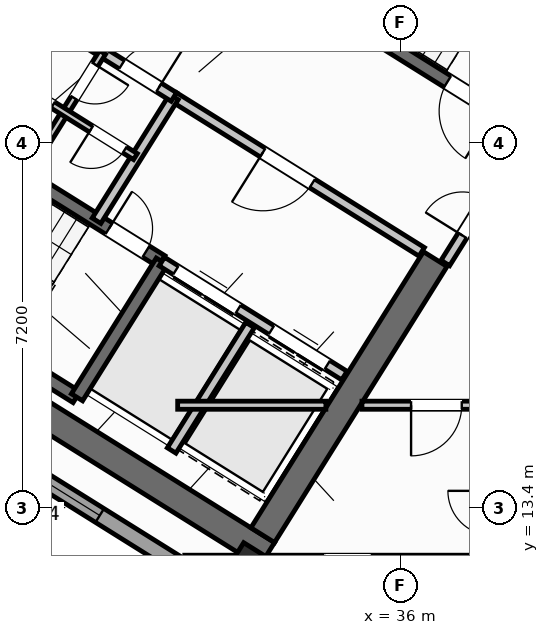
"""IFC4 building model, lengths in metres.
Left out: names, types, materials, properties, quantities, classifications, styles, units other than length and angle.
Written with IfcOpenShell. Run it as: python <this file> out.ifc"""

import sys

from ifc_helpers import new_model, si_unit, direction, frame, frame_2d, origin, origin_2d, place, context, subcontext, project, spatial, rectangle, hollow_rectangle, extrude, source, transform, mapped, element, fill, save


model = new_model("IFC4")
c1 = context("Model", 3, precision=1e-05, world=origin(), true_north=direction((0.0, 1.0)))
c2 = subcontext(c1, "Body", "Model", "MODEL_VIEW")
j1 = project(units=[si_unit("LENGTHUNIT", "METRE"), si_unit("PLANEANGLEUNIT", "RADIAN")], contexts=[c1])
p1 = place(None, origin())
s1 = spatial("IfcSite", under=j1, at=p1, CompositionType="ELEMENT")
p2 = place(p1, origin())
s2 = spatial("IfcBuilding", under=s1, at=p2, CompositionType="ELEMENT")
p3 = place(p2, frame((0.0, 0.0, 112.5)))
s3 = spatial("IfcBuildingStorey", under=s2, at=p3, CompositionType="ELEMENT", Elevation=112.5)
p4 = place(p3, frame((33.366, 12.477, 0.0), z_axis=(0.0, 0.0, 1.0), x_axis=(-0.848047359947, 0.529920442413, 0.0)))
e1 = element("IfcWall", 1, at=p4, inside=s3, PredefinedType="SHEAR", context=c2, shape_type="SweptSolid", body=[
    extrude(rectangle(XDim=13.14, YDim=0.55, at=frame_2d((6.57, 0.0))), origin(), (0.0, 0.0, 1.0), 3.35),
])
p5 = place(p3, frame((36.683, 18.304, 0.0), z_axis=(0.0, 0.0, 1.0), x_axis=(-0.529896466841, -0.848062341122, 0.0)))
e2 = element("IfcWall", 2, at=p5, inside=s3, PredefinedType="SHEAR", context=c2, shape_type="SweptSolid", body=[
    extrude(rectangle(XDim=6.425, YDim=0.55, at=frame_2d((3.212, 0.0))), origin(), (0.0, 0.0, 1.0), 3.35),
])
m1 = source(origin(), c2, "Body", "SweptSolid", [
    extrude(hollow_rectangle(XDim=0.9, YDim=0.9, WallThickness=0.036, at=origin_2d()), origin(), (0.0, 0.0, 1.0), 3.6),
])
p6 = place(p3, frame((33.046, 12.087, 0.0), z_axis=(0.0, 0.0, 1.0), x_axis=(-0.848048096156, 0.529919264233, 0.0)))
e3 = element("IfcColumn", 3, at=p6, inside=s3, PredefinedType="COLUMN", context=c2, shape_type="MappedRepresentation", body=[
    mapped(m1, transform((0.0, 0.0, 0.0), scale=1.0)),
])
p7 = place(p3, frame((31.76, 12.183, 0.0), z_axis=(0.0, 0.0, 1.0), x_axis=(-0.848047074256, 0.529920899612, 0.0)))
e4 = element("IfcWall", 4, at=p7, inside=s3, PredefinedType="STANDARD", context=c2, shape_type="SweptSolid", body=[
    extrude(rectangle(XDim=30.652, YDim=0.32, at=frame_2d((15.326, 0.0))), origin(), (0.0, 0.0, 1.0), 3.35),
])
p8 = place(p7, frame((15.153, 0.0, 0.0)))
e5 = element("IfcOpeningElement", 5, at=p8, cuts=e4, PredefinedType="OPENING", context=c2, shape_type="SweptSolid", body=[
    extrude(rectangle(XDim=1.2, YDim=2.15, at=frame_2d((0.6, 1.075))), frame((0.0, 0.17, 0.0), z_axis=(0.0, -1.0, 0.0), x_axis=(1.0, 0.0, 0.0)), (0.0, 0.0, 1.0), 0.34),
])
p9 = place(p7, frame((2.002, 0.0, 0.8)))
e6 = element("IfcOpeningElement", 6, at=p9, cuts=e4, PredefinedType="OPENING", context=c2, shape_type="SweptSolid", body=[
    extrude(rectangle(XDim=2.1, YDim=1.55, at=frame_2d((1.05, 0.775))), frame((0.0, 0.17, 0.0), z_axis=(0.0, -1.0, 0.0), x_axis=(1.0, 0.0, 0.0)), (0.0, 0.0, 1.0), 0.34),
])
p10 = place(p7, frame((7.206, 0.0, 0.8)))
e7 = element("IfcOpeningElement", 7, at=p10, cuts=e4, PredefinedType="OPENING", context=c2, shape_type="SweptSolid", body=[
    extrude(rectangle(XDim=2.1, YDim=1.55, at=frame_2d((1.05, 0.775))), frame((0.0, 0.17, 0.0), z_axis=(0.0, -1.0, 0.0), x_axis=(1.0, 0.0, 0.0)), (0.0, 0.0, 1.0), 0.34),
])
p11 = place(p7, frame((12.648, 0.0, 1.0)))
e8 = element("IfcOpeningElement", 8, at=p11, cuts=e4, PredefinedType="OPENING", context=c2, shape_type="SweptSolid", body=[
    extrude(rectangle(XDim=0.9, YDim=1.25, at=frame_2d((0.45, 0.625))), frame((0.0, 0.17, 0.0), z_axis=(0.0, -1.0, 0.0), x_axis=(1.0, 0.0, 0.0)), (0.0, 0.0, 1.0), 0.34),
])
p12 = place(p7, frame((19.59, 0.0, 0.95)))
e9 = element("IfcOpeningElement", 9, at=p12, cuts=e4, PredefinedType="OPENING", context=c2, shape_type="SweptSolid", body=[
    extrude(rectangle(XDim=1.2, YDim=1.4, at=frame_2d((0.6, 0.7))), frame((0.0, 0.17, 0.0), z_axis=(0.0, -1.0, 0.0), x_axis=(1.0, 0.0, 0.0)), (0.0, 0.0, 1.0), 0.34),
])
p13 = place(p7, frame((25.966, 0.0, 1.0)))
e10 = element("IfcOpeningElement", 10, at=p13, cuts=e4, PredefinedType="OPENING", context=c2, shape_type="SweptSolid", body=[
    extrude(rectangle(XDim=0.9, YDim=1.25, at=frame_2d((0.45, 0.625))), frame((0.0, 0.17, 0.0), z_axis=(0.0, -1.0, 0.0), x_axis=(1.0, 0.0, 0.0)), (0.0, 0.0, 1.0), 0.34),
])
p14 = place(p7, frame((28.871, 0.0, 1.0)))
e11 = element("IfcOpeningElement", 11, at=p14, cuts=e4, PredefinedType="OPENING", context=c2, shape_type="SweptSolid", body=[
    extrude(rectangle(XDim=0.9, YDim=1.25, at=frame_2d((0.45, 0.625))), frame((0.0, 0.17, 0.0), z_axis=(0.0, -1.0, 0.0), x_axis=(1.0, 0.0, 0.0)), (0.0, 0.0, 1.0), 0.34),
])
p15 = place(p3, frame((29.605, 15.581, 0.0), z_axis=(0.0, 0.0, 1.0), x_axis=(-0.848036911448, 0.529937163087, 0.0)))
e12 = element("IfcWall", 12, at=p15, inside=s3, PredefinedType="SHEAR", context=c2, shape_type="SweptSolid", body=[
    extrude(rectangle(XDim=7.46, YDim=0.26, at=frame_2d((3.73, 0.0))), origin(), (0.0, 0.0, 1.0), 3.35),
])
p16 = place(p3, frame((31.28, 18.261, 0.0), z_axis=(0.0, 0.0, 1.0), x_axis=(-0.848051618787, 0.529913626805, 0.0)))
e13 = element("IfcWall", 13, at=p16, inside=s3, PredefinedType="SHEAR", context=c2, shape_type="SweptSolid", body=[
    extrude(rectangle(XDim=7.46, YDim=0.26, at=frame_2d((3.73, 0.0))), origin(), (0.0, 0.0, 1.0), 3.35),
])
p17 = place(p16, frame((0.36, 0.0, 0.0)))
e14 = element("IfcOpeningElement", 14, at=p17, cuts=e13, PredefinedType="OPENING", context=c2, shape_type="SweptSolid", body=[
    extrude(rectangle(XDim=0.86, YDim=2.05, at=frame_2d((0.43, 1.025))), frame((0.0, 0.14, 0.0), z_axis=(0.0, -1.0, 0.0), x_axis=(1.0, 0.0, 0.0)), (0.0, 0.0, 1.0), 0.28),
])
p18 = place(p3, frame((31.288, 18.256, 0.0), z_axis=(0.0, 0.0, 1.0), x_axis=(-0.529943379326, -0.848033026897, 0.0)))
e15 = element("IfcWall", 15, at=p18, inside=s3, PredefinedType="SHEAR", context=c2, shape_type="SweptSolid", body=[
    extrude(rectangle(XDim=3.16, YDim=0.26, at=frame_2d((1.58, 0.0))), origin(), (0.0, 0.0, 1.0), 3.35),
])
p19 = place(p3, frame((38.046, 21.108, 0.0), z_axis=(0.0, 0.0, 1.0), x_axis=(-0.848054434086, 0.529909121291, 0.0)))
e16 = element("IfcWall", 16, at=p19, inside=s3, PredefinedType="SHEAR", context=c2, shape_type="SweptSolid", body=[
    extrude(rectangle(XDim=7.33, YDim=0.26, at=frame_2d((3.665, 0.0))), origin(), (0.0, 0.0, 1.0), 3.35),
])
p20 = place(p19, frame((0.22, 0.0, 0.0)))
e17 = element("IfcOpeningElement", 17, at=p20, cuts=e16, PredefinedType="OPENING", context=c2, shape_type="SweptSolid", body=[
    extrude(rectangle(XDim=1.1, YDim=2.1, at=frame_2d((0.55, 1.05))), frame((0.0, 0.14, 0.0), z_axis=(0.0, -1.0, 0.0), x_axis=(1.0, 0.0, 0.0)), (0.0, 0.0, 1.0), 0.28),
])
p21 = place(p3, frame((34.891, 16.005, 0.0), z_axis=(0.0, 0.0, 1.0), x_axis=(-0.848062873452, 0.529895614884, 0.0)))
e18 = element("IfcWall", 18, at=p21, inside=s3, PredefinedType="STANDARD", context=c2, shape_type="SweptSolid", body=[
    extrude(rectangle(XDim=4.248, YDim=0.2, at=frame_2d((2.124, 0.0))), origin(), (0.0, 0.0, 1.0), 3.34),
])
p22 = place(p21, frame((0.398, 0.0, 0.0)))
e19 = element("IfcOpeningElement", 19, at=p22, cuts=e18, PredefinedType="OPENING", context=c2, shape_type="SweptSolid", body=[
    extrude(rectangle(XDim=1.3, YDim=2.2, at=frame_2d((0.65, 1.1))), frame((0.0, 0.11, 0.0), z_axis=(0.0, -1.0, 0.0), x_axis=(1.0, 0.0, 0.0)), (0.0, 0.0, 1.0), 0.22),
])
p23 = place(p21, frame((2.473, 0.0, 0.0)))
e20 = element("IfcOpeningElement", 20, at=p23, cuts=e18, PredefinedType="OPENING", context=c2, shape_type="SweptSolid", body=[
    extrude(rectangle(XDim=1.45, YDim=2.25, at=frame_2d((0.725, 1.125))), frame((0.0, 0.11, 0.0), z_axis=(0.0, -1.0, 0.0), x_axis=(1.0, 0.0, 0.0)), (0.0, 0.0, 1.0), 0.22),
])
p24 = place(p3, frame((36.417, 18.447, 0.0), z_axis=(0.0, 0.0, 1.0), x_axis=(-0.848064879198, 0.529892404805, 0.0)))
e21 = element("IfcWall", 21, at=p24, inside=s3, PredefinedType="STANDARD", context=c2, shape_type="SweptSolid", body=[
    extrude(rectangle(XDim=5.768, YDim=0.2, at=frame_2d((2.884, 0.0))), origin(), (0.0, 0.0, 1.0), 3.34),
])
p25 = place(p24, frame((2.548, 0.0, 0.0)))
e22 = element("IfcOpeningElement", 22, at=p25, cuts=e21, PredefinedType="OPENING", context=c2, shape_type="SweptSolid", body=[
    extrude(rectangle(XDim=1.15, YDim=2.1, at=frame_2d((0.575, 1.05))), frame((0.0, 0.11, 0.0), z_axis=(0.0, -1.0, 0.0), x_axis=(1.0, 0.0, 0.0)), (0.0, 0.0, 1.0), 0.22),
])
p26 = place(p3, frame((33.029, 17.003, 0.0), z_axis=(0.0, 0.0, 1.0), x_axis=(-0.529916267533, -0.848049968695, 0.0)))
e23 = element("IfcWall", 23, at=p26, inside=s3, PredefinedType="STANDARD", context=c2, shape_type="SweptSolid", body=[
    extrude(rectangle(XDim=2.92, YDim=0.2, at=frame_2d((1.46, 0.0))), origin(), (0.0, 0.0, 1.0), 3.34),
])
p27 = place(p3, frame((31.525, 21.504, 0.0), z_axis=(0.0, 0.0, 1.0), x_axis=(-0.529907497854, -0.848055448493, 0.0)))
e24 = element("IfcWall", 24, at=p27, inside=s3, PredefinedType="STANDARD", context=c2, shape_type="SweptSolid", body=[
    extrude(rectangle(XDim=2.88, YDim=0.2, at=frame_2d((1.44, 0.0))), origin(), (0.0, 0.0, 1.0), 3.34),
])
p28 = place(p3, frame((31.525, 21.504, 0.0), z_axis=(0.0, 0.0, 1.0), x_axis=(-0.848040211232, 0.529931882541, 0.0)))
e25 = element("IfcWall", 25, at=p28, inside=s3, PredefinedType="STANDARD", context=c2, shape_type="SweptSolid", body=[
    extrude(rectangle(XDim=6.218, YDim=0.2, at=frame_2d((3.109, 0.0))), origin(), (0.0, 0.0, 1.0), 3.34),
])
p29 = place(p28, frame((4.4, 0.0, 0.0)))
e26 = element("IfcOpeningElement", 26, at=p29, cuts=e25, PredefinedType="OPENING", context=c2, shape_type="SweptSolid", body=[
    extrude(rectangle(XDim=0.86, YDim=2.05, at=frame_2d((0.43, 1.025))), frame((0.0, 0.11, 0.0), z_axis=(0.0, -1.0, 0.0), x_axis=(1.0, 0.0, 0.0)), (0.0, 0.0, 1.0), 0.22),
])
p30 = place(p28, frame((0.35, 0.0, 0.0)))
e27 = element("IfcOpeningElement", 27, at=p30, cuts=e25, PredefinedType="OPENING", context=c2, shape_type="SweptSolid", body=[
    extrude(rectangle(XDim=0.86, YDim=2.05, at=frame_2d((0.43, 1.025))), frame((0.0, 0.11, 0.0), z_axis=(0.0, -1.0, 0.0), x_axis=(1.0, 0.0, 0.0)), (0.0, 0.0, 1.0), 0.22),
])
p31 = place(p3, frame((30.117, 22.384, 0.0), z_axis=(0.0, 0.0, 1.0), x_axis=(-0.529951914384, -0.848027693204, 0.0)))
e28 = element("IfcWall", 28, at=p31, inside=s3, PredefinedType="PLUMBINGWALL", context=c2, shape_type="SweptSolid", body=[
    extrude(rectangle(XDim=1.4, YDim=0.14, at=frame_2d((0.7, 0.0))), origin(), (0.0, 0.0, 1.0), 3.34),
])
p32 = place(p31, frame((0.28, 0.0, 0.0)))
e29 = element("IfcOpeningElement", 29, at=p32, cuts=e28, PredefinedType="OPENING", context=c2, shape_type="SweptSolid", body=[
    extrude(rectangle(XDim=0.78, YDim=2.05, at=frame_2d((0.39, 1.025))), frame((0.0, 0.08, 0.0), z_axis=(0.0, -1.0, 0.0), x_axis=(1.0, 0.0, 0.0)), (0.0, 0.0, 1.0), 0.16),
])
p33 = place(p3, frame((29.375, 21.196, 0.0), z_axis=(0.0, 0.0, 1.0), x_axis=(-0.529865479138, -0.848081702443, 0.0)))
e30 = element("IfcWall", 30, at=p33, inside=s3, PredefinedType="PLUMBINGWALL", context=c2, shape_type="SweptSolid", body=[
    extrude(rectangle(XDim=1.48, YDim=0.14, at=frame_2d((0.74, 0.0))), origin(), (0.0, 0.0, 1.0), 3.34),
])
p34 = place(p3, frame((30.766, 20.327, 0.0), z_axis=(0.0, 0.0, 1.0), x_axis=(-0.848052663127, 0.529911955482, 0.0)))
e31 = element("IfcWall", 31, at=p34, inside=s3, PredefinedType="PLUMBINGWALL", context=c2, shape_type="SweptSolid", body=[
    extrude(rectangle(XDim=3.28, YDim=0.14, at=frame_2d((1.64, 0.0))), origin(), (0.0, 0.0, 1.0), 3.34),
])
p35 = place(p34, frame((0.25, 0.0, 0.0)))
e32 = element("IfcOpeningElement", 32, at=p35, cuts=e31, PredefinedType="OPENING", context=c2, shape_type="SweptSolid", body=[
    extrude(rectangle(XDim=0.78, YDim=2.05, at=frame_2d((0.39, 1.025))), frame((0.0, 0.08, 0.0), z_axis=(0.0, -1.0, 0.0), x_axis=(1.0, 0.0, 0.0)), (0.0, 0.0, 1.0), 0.16),
])
p36 = place(p34, frame((1.92, 0.0, 0.0)))
e33 = element("IfcOpeningElement", 33, at=p36, cuts=e31, PredefinedType="OPENING", context=c2, shape_type="SweptSolid", body=[
    extrude(rectangle(XDim=0.78, YDim=2.05, at=frame_2d((0.39, 1.025))), frame((0.0, 0.08, 0.0), z_axis=(0.0, -1.0, 0.0), x_axis=(1.0, 0.0, 0.0)), (0.0, 0.0, 1.0), 0.16),
])
p37 = place(p3, frame((38.451, 20.737, 0.0), z_axis=(0.0, 0.0, 1.0), x_axis=(-0.529924799939, -0.848044637038, 0.0)))
e34 = element("IfcWall", 34, at=p37, inside=s3, PredefinedType="STANDARD", context=c2, shape_type="SweptSolid", body=[
    extrude(rectangle(XDim=2.96, YDim=0.2, at=frame_2d((1.48, 0.0))), origin(), (0.0, 0.0, 1.0), 3.34),
])
p38 = place(p37, frame((1.46, 0.0, 0.0)))
e35 = element("IfcOpeningElement", 35, at=p38, cuts=e34, PredefinedType="OPENING", context=c2, shape_type="SweptSolid", body=[
    extrude(rectangle(XDim=0.86, YDim=2.05, at=frame_2d((0.43, 1.025))), frame((0.0, 0.11, 0.0), z_axis=(0.0, -1.0, 0.0), x_axis=(1.0, 0.0, 0.0)), (0.0, 0.0, 1.0), 0.22),
])
p39 = place(p3, frame((31.6, 15.42, 0.0), z_axis=(0.0, 0.0, 1.0), x_axis=(1.0, 0.0, 0.0)))
e36 = element("IfcWall", 36, at=p39, inside=s3, PredefinedType="PARTITIONING", context=c2, shape_type="SweptSolid", body=[
    extrude(rectangle(XDim=2.925, YDim=0.16, at=frame_2d((1.462, 0.0))), origin(), (0.0, 0.0, 1.0), 3.34),
])
p40 = place(p3, frame((35.237, 15.42, 0.0), z_axis=(0.0, 0.0, 1.0), x_axis=(1.0, 0.0, 0.0)))
e37 = element("IfcWall", 37, at=p40, inside=s3, PredefinedType="PARTITIONING", context=c2, shape_type="SweptSolid", body=[
    extrude(rectangle(XDim=15.432, YDim=0.16, at=frame_2d((7.716, 0.0))), origin(), (0.0, 0.0, 1.0), 3.34),
])
p41 = place(p40, frame((0.969, 0.0, 0.0)))
e38 = element("IfcOpeningElement", 38, at=p41, cuts=e37, PredefinedType="OPENING", context=c2, shape_type="SweptSolid", body=[
    extrude(rectangle(XDim=1.0, YDim=2.1, at=frame_2d((0.5, 1.05))), frame((0.0, 0.09, 0.0), z_axis=(0.0, -1.0, 0.0), x_axis=(1.0, 0.0, 0.0)), (0.0, 0.0, 1.0), 0.18),
])
p42 = place(p40, frame((8.799, 0.0, 0.0)))
e39 = element("IfcOpeningElement", 39, at=p42, cuts=e37, PredefinedType="OPENING", context=c2, shape_type="SweptSolid", body=[
    extrude(rectangle(XDim=1.0, YDim=2.1, at=frame_2d((0.5, 1.05))), frame((0.0, 0.09, 0.0), z_axis=(0.0, -1.0, 0.0), x_axis=(1.0, 0.0, 0.0)), (0.0, 0.0, 1.0), 0.18),
])
m2 = source(origin(), c2, "Body", "SweptSolid", [
    extrude(rectangle(XDim=2.1, YDim=1.55, at=frame_2d((1.05, 0.775))), frame((0.0, 0.03, 0.0), z_axis=(0.0, -1.0, 0.0), x_axis=(1.0, 0.0, 0.0)), (0.0, 0.0, 1.0), 0.06),
])
p43 = place(p9, origin())
e40 = element("IfcWindow", 40, at=p43, inside=s3, PartitioningType="SINGLE_PANEL", PredefinedType="WINDOW", context=c2, shape_type="MappedRepresentation", body=[
    mapped(m2, transform((0.0, 0.0, 0.0), scale=1.0)),
])
fill(e6, e40)
m3 = source(origin(), c2, "Body", "SweptSolid", [
    extrude(rectangle(XDim=0.86, YDim=2.05, at=frame_2d((0.43, 1.025))), frame((0.0, 0.025, 0.0), z_axis=(0.0, -1.0, 0.0), x_axis=(1.0, 0.0, 0.0)), (0.0, 0.0, 1.0), 0.05),
])
p44 = place(p17, frame((0.86, 0.0, 0.0), z_axis=(0.0, 0.0, 1.0), x_axis=(-1.0, 0.0, 0.0)))
e41 = element("IfcDoor", 41, at=p44, inside=s3, OperationType="SINGLE_SWING_LEFT", PredefinedType="DOOR", context=c2, shape_type="MappedRepresentation", body=[
    mapped(m3, transform((0.0, 0.0, 0.0), scale=1.0)),
])
fill(e14, e41)
m4 = source(origin(), c2, "Body", "SweptSolid", [
    extrude(rectangle(XDim=1.1, YDim=2.1, at=frame_2d((0.55, 1.05))), frame((0.0, 0.025, 0.0), z_axis=(0.0, -1.0, 0.0), x_axis=(1.0, 0.0, 0.0)), (0.0, 0.0, 1.0), 0.05),
])
p45 = place(p20, origin())
e42 = element("IfcDoor", 42, at=p45, inside=s3, OperationType="SINGLE_SWING_LEFT", PredefinedType="DOOR", context=c2, shape_type="MappedRepresentation", body=[
    mapped(m4, transform((0.0, 0.0, 0.0), scale=1.0)),
])
fill(e17, e42)
m5 = source(origin(), c2, "Body", "SweptSolid", [
    extrude(rectangle(XDim=1.15, YDim=2.1, at=frame_2d((0.575, 1.05))), frame((0.0, 0.025, 0.0), z_axis=(0.0, -1.0, 0.0), x_axis=(1.0, 0.0, 0.0)), (0.0, 0.0, 1.0), 0.05),
])
p46 = place(p25, origin())
e43 = element("IfcDoor", 43, at=p46, inside=s3, OperationType="SINGLE_SWING_RIGHT", PredefinedType="DOOR", context=c2, shape_type="MappedRepresentation", body=[
    mapped(m5, transform((0.0, 0.0, 0.0), scale=1.0)),
])
fill(e22, e43)
m6 = source(origin(), c2, "Body", "SweptSolid", [
    extrude(rectangle(XDim=1.3, YDim=2.2, at=frame_2d((0.65, 1.1))), frame((0.0, 0.025, 0.0), z_axis=(0.0, -1.0, 0.0), x_axis=(1.0, 0.0, 0.0)), (0.0, 0.0, 1.0), 0.05),
])
p47 = place(p22, origin())
e44 = element("IfcDoor", 44, at=p47, inside=s3, OperationType="DOUBLE_DOOR_SLIDING", PredefinedType="DOOR", context=c2, shape_type="MappedRepresentation", body=[
    mapped(m6, transform((0.0, 0.0, 0.0), scale=1.0)),
])
fill(e19, e44)
m7 = source(origin(), c2, "Body", "SweptSolid", [
    extrude(rectangle(XDim=1.45, YDim=2.25, at=frame_2d((0.725, 1.125))), frame((0.0, 0.025, 0.0), z_axis=(0.0, -1.0, 0.0), x_axis=(1.0, 0.0, 0.0)), (0.0, 0.0, 1.0), 0.05),
])
p48 = place(p23, origin())
e45 = element("IfcDoor", 45, at=p48, inside=s3, OperationType="DOUBLE_DOOR_SLIDING", PredefinedType="DOOR", context=c2, shape_type="MappedRepresentation", body=[
    mapped(m7, transform((0.0, 0.0, 0.0), scale=1.0)),
])
fill(e20, e45)
p49 = place(p30, frame((0.86, 0.0, 0.0), z_axis=(0.0, 0.0, 1.0), x_axis=(-1.0, 0.0, 0.0)))
e46 = element("IfcDoor", 46, at=p49, inside=s3, OperationType="SINGLE_SWING_RIGHT", PredefinedType="DOOR", context=c2, shape_type="MappedRepresentation", body=[
    mapped(m3, transform((0.0, 0.0, 0.0), scale=1.0)),
])
fill(e27, e46)
m8 = source(origin(), c2, "Body", "SweptSolid", [
    extrude(rectangle(XDim=0.78, YDim=2.05, at=frame_2d((0.39, 1.025))), frame((0.0, 0.025, 0.0), z_axis=(0.0, -1.0, 0.0), x_axis=(1.0, 0.0, 0.0)), (0.0, 0.0, 1.0), 0.05),
])
p50 = place(p32, origin())
e47 = element("IfcDoor", 47, at=p50, inside=s3, OperationType="SINGLE_SWING_LEFT", PredefinedType="DOOR", context=c2, shape_type="MappedRepresentation", body=[
    mapped(m8, transform((0.0, 0.0, 0.0), scale=1.0)),
])
fill(e29, e47)
p51 = place(p35, origin())
e48 = element("IfcDoor", 48, at=p51, inside=s3, OperationType="SINGLE_SWING_RIGHT", PredefinedType="DOOR", context=c2, shape_type="MappedRepresentation", body=[
    mapped(m8, transform((0.0, 0.0, 0.0), scale=1.0)),
])
fill(e32, e48)
p52 = place(p36, origin())
e49 = element("IfcDoor", 49, at=p52, inside=s3, OperationType="SINGLE_SWING_LEFT", PredefinedType="DOOR", context=c2, shape_type="MappedRepresentation", body=[
    mapped(m8, transform((0.0, 0.0, 0.0), scale=1.0)),
])
fill(e33, e49)
p53 = place(p38, frame((0.86, 0.0, 0.0), z_axis=(0.0, 0.0, 1.0), x_axis=(-1.0, 0.0, 0.0)))
e50 = element("IfcDoor", 50, at=p53, inside=s3, OperationType="SINGLE_SWING_LEFT", PredefinedType="DOOR", context=c2, shape_type="MappedRepresentation", body=[
    mapped(m3, transform((0.0, 0.0, 0.0), scale=1.0)),
])
fill(e35, e50)
m9 = source(origin(), c2, "Body", "SweptSolid", [
    extrude(rectangle(XDim=1.0, YDim=2.1, at=frame_2d((0.5, 1.05))), frame((0.0, 0.025, 0.0), z_axis=(0.0, -1.0, 0.0), x_axis=(1.0, 0.0, 0.0)), (0.0, 0.0, 1.0), 0.05),
])
p54 = place(p41, frame((1.0, 0.0, 0.0), z_axis=(0.0, 0.0, 1.0), x_axis=(-1.0, 0.0, 0.0)))
e51 = element("IfcDoor", 51, at=p54, inside=s3, OperationType="SINGLE_SWING_RIGHT", PredefinedType="DOOR", context=c2, shape_type="MappedRepresentation", body=[
    mapped(m9, transform((0.0, 0.0, 0.0), scale=1.0)),
])
fill(e38, e51)
save(model, sys.argv[1])
